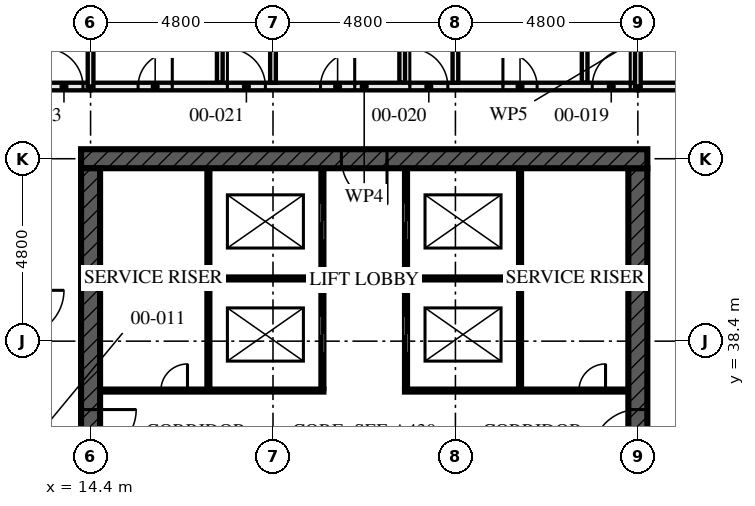
"""IFC4 building model, lengths in metres.
Left out: names, types, materials, properties, quantities, classifications, styles, units other than length and angle.
Written with IfcOpenShell. Run it as: python <this file> out.ifc"""

import sys

from ifc_helpers import new_model, si_unit, direction, frame, frame_2d, origin, place, context, subcontext, project, spatial, rectangle, extrude, element, fill, save


model = new_model("IFC4")
c1 = context("Model", 3, precision=1e-05, world=origin(), true_north=direction((0.0, 1.0)))
c2 = subcontext(c1, "Body", "Model", "MODEL_VIEW")
j1 = project(units=[si_unit("LENGTHUNIT", "METRE"), si_unit("PLANEANGLEUNIT", "RADIAN")], contexts=[c1])
p1 = place(None, origin())
s1 = spatial("IfcSite", under=j1, at=p1, CompositionType="ELEMENT")
p2 = place(p1, origin())
s2 = spatial("IfcBuilding", under=s1, at=p2, CompositionType="ELEMENT")
p3 = place(p2, origin())
s3 = spatial("IfcBuildingStorey", under=s2, at=p3, CompositionType="ELEMENT", Elevation=0.0)
p4 = place(p3, frame((29.05, 43.2, -1.8), z_axis=(0.0, 0.0, 1.0), x_axis=(-1.0, 0.0, 0.0)))
e1 = element("IfcWall", 1, at=p4, inside=s3, PredefinedType="SHEAR", context=c2, shape_type="SweptSolid", body=[
    extrude(rectangle(XDim=14.9, YDim=0.5, at=frame_2d((7.45, 0.0))), origin(), (0.0, 0.0, 1.0), 6.13),
])
p5 = place(p4, frame((6.85, 0.0, 1.8)))
e2 = element("IfcOpeningElement", 2, at=p5, cuts=e1, PredefinedType="OPENING", context=c2, shape_type="SweptSolid", body=[
    extrude(rectangle(XDim=1.2, YDim=2.1, at=frame_2d((0.6, 1.05))), frame((0.0, 0.26, 0.0), z_axis=(0.0, -1.0, 0.0), x_axis=(1.0, 0.0, 0.0)), (0.0, 0.0, 1.0), 0.521),
])
p6 = place(p3, frame((14.4, 42.95, -1.8), z_axis=(0.0, 0.0, 1.0), x_axis=(0.0, -1.0, 0.0)))
e3 = element("IfcWall", 3, at=p6, inside=s3, PredefinedType="SHEAR", context=c2, shape_type="SweptSolid", body=[
    extrude(rectangle(XDim=13.9, YDim=0.5, at=frame_2d((6.95, 0.0))), origin(), (0.0, 0.0, 1.0), 6.13),
])
p7 = place(p6, frame((6.35, 0.0, 1.8)))
e4 = element("IfcOpeningElement", 4, at=p7, cuts=e3, PredefinedType="OPENING", context=c2, shape_type="SweptSolid", body=[
    extrude(rectangle(XDim=1.2, YDim=2.1, at=frame_2d((0.6, 1.05))), frame((0.0, 0.26, 0.0), z_axis=(0.0, -1.0, 0.0), x_axis=(1.0, 0.0, 0.0)), (0.0, 0.0, 1.0), 0.521),
])
p8 = place(p3, frame((28.8, 29.05, -1.8), z_axis=(0.0, 0.0, 1.0), x_axis=(0.0, 1.0, 0.0)))
e5 = element("IfcWall", 5, at=p8, inside=s3, PredefinedType="SHEAR", context=c2, shape_type="SweptSolid", body=[
    extrude(rectangle(XDim=13.9, YDim=0.5, at=frame_2d((6.95, 0.0))), origin(), (0.0, 0.0, 1.0), 6.13),
])
p9 = place(p8, frame((6.35, 0.0, 1.8)))
e6 = element("IfcOpeningElement", 6, at=p9, cuts=e5, PredefinedType="OPENING", context=c2, shape_type="SweptSolid", body=[
    extrude(rectangle(XDim=1.2, YDim=2.1, at=frame_2d((0.6, 1.05))), frame((0.0, 0.26, 0.0), z_axis=(0.0, -1.0, 0.0), x_axis=(1.0, 0.0, 0.0)), (0.0, 0.0, 1.0), 0.521),
])
p10 = place(p3, frame((14.4, 45.1, 0.0), z_axis=(0.0, 0.0, 1.0), x_axis=(-1.0, 0.0, 0.0)))
e7 = element("IfcWall", 7, at=p10, inside=s3, PredefinedType="PARTITIONING", context=c2, shape_type="SweptSolid", body=[
    extrude(rectangle(XDim=11.0, YDim=0.2, at=frame_2d((5.5, 0.0))), origin(), (0.0, 0.0, 1.0), 4.33),
])
p11 = place(p10, frame((0.2, 0.0, 0.0)))
e8 = element("IfcOpeningElement", 8, at=p11, cuts=e7, PredefinedType="OPENING", context=c2, shape_type="SweptSolid", body=[
    extrude(rectangle(XDim=1.0, YDim=2.4, at=frame_2d((0.5, 1.2))), frame((0.0, 0.111, 0.0), z_axis=(0.0, -1.0, 0.0), x_axis=(1.0, 0.0, 0.0)), (0.0, 0.0, 1.0), 0.221),
])
p12 = place(p10, frame((5.0, 0.0, 0.0)))
e9 = element("IfcOpeningElement", 9, at=p12, cuts=e7, PredefinedType="OPENING", context=c2, shape_type="SweptSolid", body=[
    extrude(rectangle(XDim=1.0, YDim=2.4, at=frame_2d((0.5, 1.2))), frame((0.0, 0.111, 0.0), z_axis=(0.0, -1.0, 0.0), x_axis=(1.0, 0.0, 0.0)), (0.0, 0.0, 1.0), 0.221),
])
p13 = place(p10, frame((9.8, 0.0, 0.0)))
e10 = element("IfcOpeningElement", 10, at=p13, cuts=e7, PredefinedType="OPENING", context=c2, shape_type="SweptSolid", body=[
    extrude(rectangle(XDim=1.0, YDim=2.4, at=frame_2d((0.5, 1.2))), frame((0.0, 0.111, 0.0), z_axis=(0.0, -1.0, 0.0), x_axis=(1.0, 0.0, 0.0)), (0.0, 0.0, 1.0), 0.221),
])
p14 = place(p10, frame((2.65, 0.0, 0.0)))
e11 = element("IfcOpeningElement", 11, at=p14, cuts=e7, PredefinedType="OPENING", context=c2, shape_type="SweptSolid", body=[
    extrude(rectangle(XDim=0.9, YDim=2.1, at=frame_2d((0.45, 1.05))), frame((0.0, 0.111, 0.0), z_axis=(0.0, -1.0, 0.0), x_axis=(1.0, 0.0, 0.0)), (0.0, 0.0, 1.0), 0.221),
])
p15 = place(p10, frame((7.4, 0.0, 0.0)))
e12 = element("IfcOpeningElement", 12, at=p15, cuts=e7, PredefinedType="OPENING", context=c2, shape_type="SweptSolid", body=[
    extrude(rectangle(XDim=1.0, YDim=2.1, at=frame_2d((0.5, 1.05))), frame((0.0, 0.111, 0.0), z_axis=(0.0, -1.0, 0.0), x_axis=(1.0, 0.0, 0.0)), (0.0, 0.0, 1.0), 0.221),
])
for number, where, z_axis, x_axis in (
    (13, (27.4, 48.7, 0.0), (0.0, 0.0, 1.0), (0.0, -1.0, 0.0)),
    (14, (22.6, 48.7, 0.0), (0.0, 0.0, 1.0), (0.0, -1.0, 0.0)),
    (15, (17.8, 48.7, 0.0), (0.0, 0.0, 1.0), (0.0, -1.0, 0.0)),
):
    element("IfcWall", number, at=place(p3, frame(where, z_axis=z_axis, x_axis=x_axis)), inside=s3, PredefinedType="PARTITIONING", context=c2, shape_type="SweptSolid", body=[
        extrude(rectangle(XDim=3.5, YDim=0.15, at=frame_2d((1.75, 0.0))), origin(), (0.0, 0.0, 1.0), 3.55),
    ])
for number, where, z_axis, x_axis in (
    (16, (24.0, 57.205, 0.0), (0.0, 0.0, 1.0), (0.0, -1.0, 0.0)),
    (17, (19.2, 57.205, 0.0), (0.0, 0.0, 1.0), (0.0, -1.0, 0.0)),
):
    element("IfcWall", number, at=place(p3, frame(where, z_axis=z_axis, x_axis=x_axis)), inside=s3, PredefinedType="PARTITIONING", context=c2, shape_type="SweptSolid", body=[
        extrude(rectangle(XDim=12.005, YDim=0.15, at=frame_2d((6.002, 0.0))), origin(), (0.0, 0.0, 1.0), 3.55),
    ])
p16 = place(p3, frame((28.8, 45.1, 0.0), z_axis=(0.0, 0.0, 1.0), x_axis=(-1.0, 0.0, 0.0)))
e18 = element("IfcWall", 18, at=p16, inside=s3, PredefinedType="PARTITIONING", context=c2, shape_type="SweptSolid", body=[
    extrude(rectangle(XDim=14.4, YDim=0.2, at=frame_2d((7.2, 0.0))), origin(), (0.0, 0.0, 1.0), 4.33),
])
p17 = place(p16, frame((0.2, 0.0, 0.0)))
e19 = element("IfcOpeningElement", 19, at=p17, cuts=e18, PredefinedType="OPENING", context=c2, shape_type="SweptSolid", body=[
    extrude(rectangle(XDim=1.0, YDim=2.4, at=frame_2d((0.5, 1.2))), frame((0.0, 0.111, 0.0), z_axis=(0.0, -1.0, 0.0), x_axis=(1.0, 0.0, 0.0)), (0.0, 0.0, 1.0), 0.221),
])
p18 = place(p16, frame((5.0, 0.0, 0.0)))
e20 = element("IfcOpeningElement", 20, at=p18, cuts=e18, PredefinedType="OPENING", context=c2, shape_type="SweptSolid", body=[
    extrude(rectangle(XDim=1.0, YDim=2.4, at=frame_2d((0.5, 1.2))), frame((0.0, 0.111, 0.0), z_axis=(0.0, -1.0, 0.0), x_axis=(1.0, 0.0, 0.0)), (0.0, 0.0, 1.0), 0.221),
])
p19 = place(p16, frame((9.8, 0.0, 0.0)))
e21 = element("IfcOpeningElement", 21, at=p19, cuts=e18, PredefinedType="OPENING", context=c2, shape_type="SweptSolid", body=[
    extrude(rectangle(XDim=1.0, YDim=2.4, at=frame_2d((0.5, 1.2))), frame((0.0, 0.111, 0.0), z_axis=(0.0, -1.0, 0.0), x_axis=(1.0, 0.0, 0.0)), (0.0, 0.0, 1.0), 0.221),
])
p20 = place(p16, frame((2.65, 0.0, 0.0)))
e22 = element("IfcOpeningElement", 22, at=p20, cuts=e18, PredefinedType="OPENING", context=c2, shape_type="SweptSolid", body=[
    extrude(rectangle(XDim=0.9, YDim=2.1, at=frame_2d((0.45, 1.05))), frame((0.0, 0.111, 0.0), z_axis=(0.0, -1.0, 0.0), x_axis=(1.0, 0.0, 0.0)), (0.0, 0.0, 1.0), 0.221),
])
p21 = place(p16, frame((7.45, 0.0, 0.0)))
e23 = element("IfcOpeningElement", 23, at=p21, cuts=e18, PredefinedType="OPENING", context=c2, shape_type="SweptSolid", body=[
    extrude(rectangle(XDim=0.9, YDim=2.1, at=frame_2d((0.45, 1.05))), frame((0.0, 0.111, 0.0), z_axis=(0.0, -1.0, 0.0), x_axis=(1.0, 0.0, 0.0)), (0.0, 0.0, 1.0), 0.221),
])
p22 = place(p16, frame((12.25, 0.0, 0.0)))
e24 = element("IfcOpeningElement", 24, at=p22, cuts=e18, PredefinedType="OPENING", context=c2, shape_type="SweptSolid", body=[
    extrude(rectangle(XDim=0.9, YDim=2.1, at=frame_2d((0.45, 1.05))), frame((0.0, 0.111, 0.0), z_axis=(0.0, -1.0, 0.0), x_axis=(1.0, 0.0, 0.0)), (0.0, 0.0, 1.0), 0.221),
])
p23 = place(p3, frame((41.8, 45.1, 0.0), z_axis=(0.0, 0.0, 1.0), x_axis=(-1.0, 0.0, 0.0)))
e25 = element("IfcWall", 25, at=p23, inside=s3, PredefinedType="PARTITIONING", context=c2, shape_type="SweptSolid", body=[
    extrude(rectangle(XDim=13.0, YDim=0.2, at=frame_2d((6.5, 0.0))), origin(), (0.0, 0.0, 1.0), 4.33),
])
p24 = place(p23, frame((3.6, 0.0, 0.0)))
e26 = element("IfcOpeningElement", 26, at=p24, cuts=e25, PredefinedType="OPENING", context=c2, shape_type="SweptSolid", body=[
    extrude(rectangle(XDim=1.0, YDim=2.4, at=frame_2d((0.5, 1.2))), frame((0.0, 0.111, 0.0), z_axis=(0.0, -1.0, 0.0), x_axis=(1.0, 0.0, 0.0)), (0.0, 0.0, 1.0), 0.221),
])
p25 = place(p23, frame((8.4, 0.0, 0.0)))
e27 = element("IfcOpeningElement", 27, at=p25, cuts=e25, PredefinedType="OPENING", context=c2, shape_type="SweptSolid", body=[
    extrude(rectangle(XDim=1.0, YDim=2.4, at=frame_2d((0.5, 1.2))), frame((0.0, 0.111, 0.0), z_axis=(0.0, -1.0, 0.0), x_axis=(1.0, 0.0, 0.0)), (0.0, 0.0, 1.0), 0.221),
])
p26 = place(p23, frame((1.25, 0.0, 0.0)))
e28 = element("IfcOpeningElement", 28, at=p26, cuts=e25, PredefinedType="OPENING", context=c2, shape_type="SweptSolid", body=[
    extrude(rectangle(XDim=0.9, YDim=2.1, at=frame_2d((0.45, 1.05))), frame((0.0, 0.111, 0.0), z_axis=(0.0, -1.0, 0.0), x_axis=(1.0, 0.0, 0.0)), (0.0, 0.0, 1.0), 0.221),
])
p27 = place(p23, frame((6.05, 0.0, 0.0)))
e29 = element("IfcOpeningElement", 29, at=p27, cuts=e25, PredefinedType="OPENING", context=c2, shape_type="SweptSolid", body=[
    extrude(rectangle(XDim=0.9, YDim=2.1, at=frame_2d((0.45, 1.05))), frame((0.0, 0.111, 0.0), z_axis=(0.0, -1.0, 0.0), x_axis=(1.0, 0.0, 0.0)), (0.0, 0.0, 1.0), 0.221),
])
p28 = place(p23, frame((10.85, 0.0, 0.0)))
e30 = element("IfcOpeningElement", 30, at=p28, cuts=e25, PredefinedType="OPENING", context=c2, shape_type="SweptSolid", body=[
    extrude(rectangle(XDim=0.9, YDim=2.1, at=frame_2d((0.45, 1.05))), frame((0.0, 0.111, 0.0), z_axis=(0.0, -1.0, 0.0), x_axis=(1.0, 0.0, 0.0)), (0.0, 0.0, 1.0), 0.221),
])
p29 = place(p3, frame((20.5, 37.15, -1.8), z_axis=(0.0, 0.0, 1.0), x_axis=(0.0, 1.0, 0.0)))
e31 = element("IfcWall", 31, at=p29, inside=s3, PredefinedType="SOLIDWALL", context=c2, shape_type="SweptSolid", body=[
    extrude(rectangle(XDim=5.8, YDim=0.1, at=frame_2d((2.9, 0.0))), origin(), (0.0, 0.0, 1.0), 6.13),
])
p30 = place(p29, frame((0.925, 0.0, 1.8)))
e32 = element("IfcOpeningElement", 32, at=p30, cuts=e31, PredefinedType="OPENING", context=c2, shape_type="SweptSolid", body=[
    extrude(rectangle(XDim=1.0, YDim=2.1, at=frame_2d((0.5, 1.05))), frame((0.0, 0.061, 0.0), z_axis=(0.0, -1.0, 0.0), x_axis=(1.0, 0.0, 0.0)), (0.0, 0.0, 1.0), 0.121),
])
p31 = place(p29, frame((3.9, 0.0, 1.8)))
e33 = element("IfcOpeningElement", 33, at=p31, cuts=e31, PredefinedType="OPENING", context=c2, shape_type="SweptSolid", body=[
    extrude(rectangle(XDim=1.0, YDim=2.1, at=frame_2d((0.5, 1.05))), frame((0.0, 0.061, 0.0), z_axis=(0.0, -1.0, 0.0), x_axis=(1.0, 0.0, 0.0)), (0.0, 0.0, 1.0), 0.121),
])
p32 = place(p3, frame((22.7, 37.15, -1.8), z_axis=(0.0, 0.0, 1.0), x_axis=(0.0, 1.0, 0.0)))
e34 = element("IfcWall", 34, at=p32, inside=s3, PredefinedType="SOLIDWALL", context=c2, shape_type="SweptSolid", body=[
    extrude(rectangle(XDim=5.8, YDim=0.1, at=frame_2d((2.9, 0.0))), origin(), (0.0, 0.0, 1.0), 6.13),
])
p33 = place(p32, frame((0.925, 0.0, 1.8)))
e35 = element("IfcOpeningElement", 35, at=p33, cuts=e34, PredefinedType="OPENING", context=c2, shape_type="SweptSolid", body=[
    extrude(rectangle(XDim=1.0, YDim=2.1, at=frame_2d((0.5, 1.05))), frame((0.0, 0.061, 0.0), z_axis=(0.0, -1.0, 0.0), x_axis=(1.0, 0.0, 0.0)), (0.0, 0.0, 1.0), 0.121),
])
p34 = place(p32, frame((3.9, 0.0, 1.8)))
e36 = element("IfcOpeningElement", 36, at=p34, cuts=e34, PredefinedType="OPENING", context=c2, shape_type="SweptSolid", body=[
    extrude(rectangle(XDim=1.0, YDim=2.1, at=frame_2d((0.5, 1.05))), frame((0.0, 0.061, 0.0), z_axis=(0.0, -1.0, 0.0), x_axis=(1.0, 0.0, 0.0)), (0.0, 0.0, 1.0), 0.121),
])
p35 = place(p3, frame((14.65, 37.1, -1.8), z_axis=(0.0, 0.0, 1.0), x_axis=(1.0, 0.0, 0.0)))
e37 = element("IfcWall", 37, at=p35, inside=s3, PredefinedType="SOLIDWALL", context=c2, shape_type="SweptSolid", body=[
    extrude(rectangle(XDim=5.9, YDim=0.1, at=frame_2d((2.95, 0.0))), origin(), (0.0, 0.0, 1.0), 6.13),
])
p36 = place(p35, frame((1.6, 0.0, 1.8)))
e38 = element("IfcOpeningElement", 38, at=p36, cuts=e37, PredefinedType="OPENING", context=c2, shape_type="SweptSolid", body=[
    extrude(rectangle(XDim=0.7, YDim=2.1, at=frame_2d((0.35, 1.05))), frame((0.0, 0.061, 0.0), z_axis=(0.0, -1.0, 0.0), x_axis=(1.0, 0.0, 0.0)), (0.0, 0.0, 1.0), 0.121),
])
p37 = place(p3, frame((22.65, 37.1, -1.8), z_axis=(0.0, 0.0, 1.0), x_axis=(1.0, 0.0, 0.0)))
e39 = element("IfcWall", 39, at=p37, inside=s3, PredefinedType="SOLIDWALL", context=c2, shape_type="SweptSolid", body=[
    extrude(rectangle(XDim=5.9, YDim=0.1, at=frame_2d((2.95, 0.0))), origin(), (0.0, 0.0, 1.0), 6.13),
])
p38 = place(p37, frame((4.6, 0.0, 1.8)))
e40 = element("IfcOpeningElement", 40, at=p38, cuts=e39, PredefinedType="OPENING", context=c2, shape_type="SweptSolid", body=[
    extrude(rectangle(XDim=0.7, YDim=2.1, at=frame_2d((0.35, 1.05))), frame((0.0, 0.061, 0.0), z_axis=(0.0, -1.0, 0.0), x_axis=(1.0, 0.0, 0.0)), (0.0, 0.0, 1.0), 0.121),
])
p39 = place(p3, frame((17.5, 37.15, -1.8), z_axis=(0.0, 0.0, 1.0), x_axis=(0.0, 1.0, 0.0)))
e41 = element("IfcWall", 41, at=p39, inside=s3, PredefinedType="SOLIDWALL", context=c2, shape_type="SweptSolid", body=[
    extrude(rectangle(XDim=5.8, YDim=0.1, at=frame_2d((2.9, 0.0))), origin(), (0.0, 0.0, 1.0), 6.13),
])
for number, where, z_axis, x_axis in (
    (42, (17.55, 40.05, -1.8), (0.0, 0.0, 1.0), (1.0, 0.0, 0.0)),
    (43, (22.75, 40.05, -1.8), (0.0, 0.0, 1.0), (1.0, 0.0, 0.0)),
):
    element("IfcWall", number, at=place(p3, frame(where, z_axis=z_axis, x_axis=x_axis)), inside=s3, PredefinedType="SOLIDWALL", context=c2, shape_type="SweptSolid", body=[
        extrude(rectangle(XDim=2.9, YDim=0.1, at=frame_2d((1.45, 0.0))), origin(), (0.0, 0.0, 1.0), 6.13),
    ])
p40 = place(p3, frame((25.7, 37.15, -1.8), z_axis=(0.0, 0.0, 1.0), x_axis=(0.0, 1.0, 0.0)))
e44 = element("IfcWall", 44, at=p40, inside=s3, PredefinedType="SOLIDWALL", context=c2, shape_type="SweptSolid", body=[
    extrude(rectangle(XDim=5.8, YDim=0.1, at=frame_2d((2.9, 0.0))), origin(), (0.0, 0.0, 1.0), 6.13),
])
for number, where, z_axis, x_axis in (
    (45, (14.4, 45.1, 0.0), (0.0, 0.0, 1.0), (0.0, 1.0, 0.0)),
    (46, (28.8, 45.1, 0.0), (0.0, 0.0, 1.0), (0.0, 1.0, 0.0)),
):
    element("IfcWall", number, at=place(p3, frame(where, z_axis=z_axis, x_axis=x_axis)), inside=s3, PredefinedType="PARTITIONING", context=c2, shape_type="SweptSolid", body=[
        extrude(rectangle(XDim=2.505, YDim=0.15, at=frame_2d((1.252, 0.0))), origin(), (0.0, 0.0, 1.0), 3.32),
    ])
p41 = place(p11, frame((1.0, 0.0, 0.0), z_axis=(0.0, 0.0, 1.0), x_axis=(-1.0, 0.0, 0.0)))
e47 = element("IfcDoor", 47, at=p41, inside=s3, OperationType="SINGLE_SWING_RIGHT", PredefinedType="DOOR", context=c2, shape_type="SweptSolid", body=[
    extrude(rectangle(XDim=1.0, YDim=2.4, at=frame_2d((0.5, 1.2))), frame((0.0, 0.027, 0.0), z_axis=(0.0, -1.0, 0.0), x_axis=(1.0, 0.0, 0.0)), (0.0, 0.0, 1.0), 0.054),
])
fill(e8, e47)
p42 = place(p17, frame((1.0, 0.0, 0.0), z_axis=(0.0, 0.0, 1.0), x_axis=(-1.0, 0.0, 0.0)))
e48 = element("IfcDoor", 48, at=p42, inside=s3, OperationType="SINGLE_SWING_LEFT", PredefinedType="DOOR", context=c2, shape_type="SweptSolid", body=[
    extrude(rectangle(XDim=1.0, YDim=2.4, at=frame_2d((0.5, 1.2))), frame((0.0, 0.027, 0.0), z_axis=(0.0, -1.0, 0.0), x_axis=(1.0, 0.0, 0.0)), (0.0, 0.0, 1.0), 0.054),
])
fill(e19, e48)
p43 = place(p18, frame((1.0, 0.0, 0.0), z_axis=(0.0, 0.0, 1.0), x_axis=(-1.0, 0.0, 0.0)))
e49 = element("IfcDoor", 49, at=p43, inside=s3, OperationType="SINGLE_SWING_RIGHT", PredefinedType="DOOR", context=c2, shape_type="SweptSolid", body=[
    extrude(rectangle(XDim=1.0, YDim=2.4, at=frame_2d((0.5, 1.2))), frame((0.0, 0.027, 0.0), z_axis=(0.0, -1.0, 0.0), x_axis=(1.0, 0.0, 0.0)), (0.0, 0.0, 1.0), 0.054),
])
fill(e20, e49)
p44 = place(p19, frame((1.0, 0.0, 0.0), z_axis=(0.0, 0.0, 1.0), x_axis=(-1.0, 0.0, 0.0)))
e50 = element("IfcDoor", 50, at=p44, inside=s3, OperationType="SINGLE_SWING_RIGHT", PredefinedType="DOOR", context=c2, shape_type="SweptSolid", body=[
    extrude(rectangle(XDim=1.0, YDim=2.4, at=frame_2d((0.5, 1.2))), frame((0.0, 0.027, 0.0), z_axis=(0.0, -1.0, 0.0), x_axis=(1.0, 0.0, 0.0)), (0.0, 0.0, 1.0), 0.054),
])
fill(e21, e50)
p45 = place(p20, frame((0.9, 0.0, 0.0), z_axis=(0.0, 0.0, 1.0), x_axis=(-1.0, 0.0, 0.0)))
e51 = element("IfcDoor", 51, at=p45, inside=s3, OperationType="SINGLE_SWING_RIGHT", PredefinedType="DOOR", context=c2, shape_type="SweptSolid", body=[
    extrude(rectangle(XDim=0.9, YDim=2.1, at=frame_2d((0.45, 1.05))), frame((0.0, 0.027, 0.0), z_axis=(0.0, -1.0, 0.0), x_axis=(1.0, 0.0, 0.0)), (0.0, 0.0, 1.0), 0.054),
])
fill(e22, e51)
p46 = place(p21, frame((0.9, 0.0, 0.0), z_axis=(0.0, 0.0, 1.0), x_axis=(-1.0, 0.0, 0.0)))
e52 = element("IfcDoor", 52, at=p46, inside=s3, OperationType="SINGLE_SWING_LEFT", PredefinedType="DOOR", context=c2, shape_type="SweptSolid", body=[
    extrude(rectangle(XDim=0.9, YDim=2.1, at=frame_2d((0.45, 1.05))), frame((0.0, 0.027, 0.0), z_axis=(0.0, -1.0, 0.0), x_axis=(1.0, 0.0, 0.0)), (0.0, 0.0, 1.0), 0.054),
])
fill(e23, e52)
p47 = place(p22, frame((0.9, 0.0, 0.0), z_axis=(0.0, 0.0, 1.0), x_axis=(-1.0, 0.0, 0.0)))
e53 = element("IfcDoor", 53, at=p47, inside=s3, OperationType="SINGLE_SWING_LEFT", PredefinedType="DOOR", context=c2, shape_type="SweptSolid", body=[
    extrude(rectangle(XDim=0.9, YDim=2.1, at=frame_2d((0.45, 1.05))), frame((0.0, 0.027, 0.0), z_axis=(0.0, -1.0, 0.0), x_axis=(1.0, 0.0, 0.0)), (0.0, 0.0, 1.0), 0.054),
])
fill(e24, e53)
p48 = place(p30, origin())
e54 = element("IfcDoor", 54, at=p48, inside=s3, OperationType="SLIDING_TO_LEFT", PredefinedType="DOOR", context=c2, shape_type="SweptSolid", body=[
    extrude(rectangle(XDim=1.0, YDim=2.1, at=frame_2d((0.5, 1.05))), frame((0.0, 0.05, 0.0), z_axis=(0.0, -1.0, 0.0), x_axis=(1.0, 0.0, 0.0)), (0.0, 0.0, 1.0), 0.1),
])
fill(e32, e54)
p49 = place(p31, origin())
e55 = element("IfcDoor", 55, at=p49, inside=s3, OperationType="SLIDING_TO_LEFT", PredefinedType="DOOR", context=c2, shape_type="SweptSolid", body=[
    extrude(rectangle(XDim=1.0, YDim=2.1, at=frame_2d((0.5, 1.05))), frame((0.0, 0.05, 0.0), z_axis=(0.0, -1.0, 0.0), x_axis=(1.0, 0.0, 0.0)), (0.0, 0.0, 1.0), 0.1),
])
fill(e33, e55)
p50 = place(p33, origin())
e56 = element("IfcDoor", 56, at=p50, inside=s3, OperationType="SLIDING_TO_LEFT", PredefinedType="DOOR", context=c2, shape_type="SweptSolid", body=[
    extrude(rectangle(XDim=1.0, YDim=2.1, at=frame_2d((0.5, 1.05))), frame((0.0, 0.05, 0.0), z_axis=(0.0, -1.0, 0.0), x_axis=(1.0, 0.0, 0.0)), (0.0, 0.0, 1.0), 0.1),
])
fill(e35, e56)
p51 = place(p34, origin())
e57 = element("IfcDoor", 57, at=p51, inside=s3, OperationType="SLIDING_TO_LEFT", PredefinedType="DOOR", context=c2, shape_type="SweptSolid", body=[
    extrude(rectangle(XDim=1.0, YDim=2.1, at=frame_2d((0.5, 1.05))), frame((0.0, 0.05, 0.0), z_axis=(0.0, -1.0, 0.0), x_axis=(1.0, 0.0, 0.0)), (0.0, 0.0, 1.0), 0.1),
])
fill(e36, e57)
p52 = place(p36, origin())
e58 = element("IfcDoor", 58, at=p52, inside=s3, OperationType="SINGLE_SWING_LEFT", PredefinedType="DOOR", context=c2, shape_type="SweptSolid", body=[
    extrude(rectangle(XDim=0.7, YDim=2.1, at=frame_2d((0.35, 1.05))), frame((0.0, 0.027, 0.0), z_axis=(0.0, -1.0, 0.0), x_axis=(1.0, 0.0, 0.0)), (0.0, 0.0, 1.0), 0.054),
])
fill(e38, e58)
p53 = place(p38, origin())
e59 = element("IfcDoor", 59, at=p53, inside=s3, OperationType="SINGLE_SWING_LEFT", PredefinedType="DOOR", context=c2, shape_type="SweptSolid", body=[
    extrude(rectangle(XDim=0.7, YDim=2.1, at=frame_2d((0.35, 1.05))), frame((0.0, 0.027, 0.0), z_axis=(0.0, -1.0, 0.0), x_axis=(1.0, 0.0, 0.0)), (0.0, 0.0, 1.0), 0.054),
])
fill(e40, e59)
p54 = place(p7, origin())
e60 = element("IfcDoor", 60, at=p54, inside=s3, OperationType="SINGLE_SWING_LEFT", PredefinedType="DOOR", context=c2, shape_type="SweptSolid", body=[
    extrude(rectangle(XDim=1.2, YDim=2.1, at=frame_2d((0.6, 1.05))), frame((0.0, 0.027, 0.0), z_axis=(0.0, -1.0, 0.0), x_axis=(1.0, 0.0, 0.0)), (0.0, 0.0, 1.0), 0.054),
])
fill(e4, e60)
p55 = place(p9, origin())
e61 = element("IfcDoor", 61, at=p55, inside=s3, OperationType="SINGLE_SWING_LEFT", PredefinedType="DOOR", context=c2, shape_type="SweptSolid", body=[
    extrude(rectangle(XDim=1.2, YDim=2.1, at=frame_2d((0.6, 1.05))), frame((0.0, 0.027, 0.0), z_axis=(0.0, -1.0, 0.0), x_axis=(1.0, 0.0, 0.0)), (0.0, 0.0, 1.0), 0.054),
])
fill(e6, e61)
p56 = place(p5, origin())
e62 = element("IfcDoor", 62, at=p56, inside=s3, OperationType="SINGLE_SWING_LEFT", PredefinedType="DOOR", context=c2, shape_type="SweptSolid", body=[
    extrude(rectangle(XDim=1.2, YDim=2.1, at=frame_2d((0.6, 1.05))), frame((0.0, 0.027, 0.0), z_axis=(0.0, -1.0, 0.0), x_axis=(1.0, 0.0, 0.0)), (0.0, 0.0, 1.0), 0.054),
])
fill(e2, e62)
save(model, sys.argv[1])
